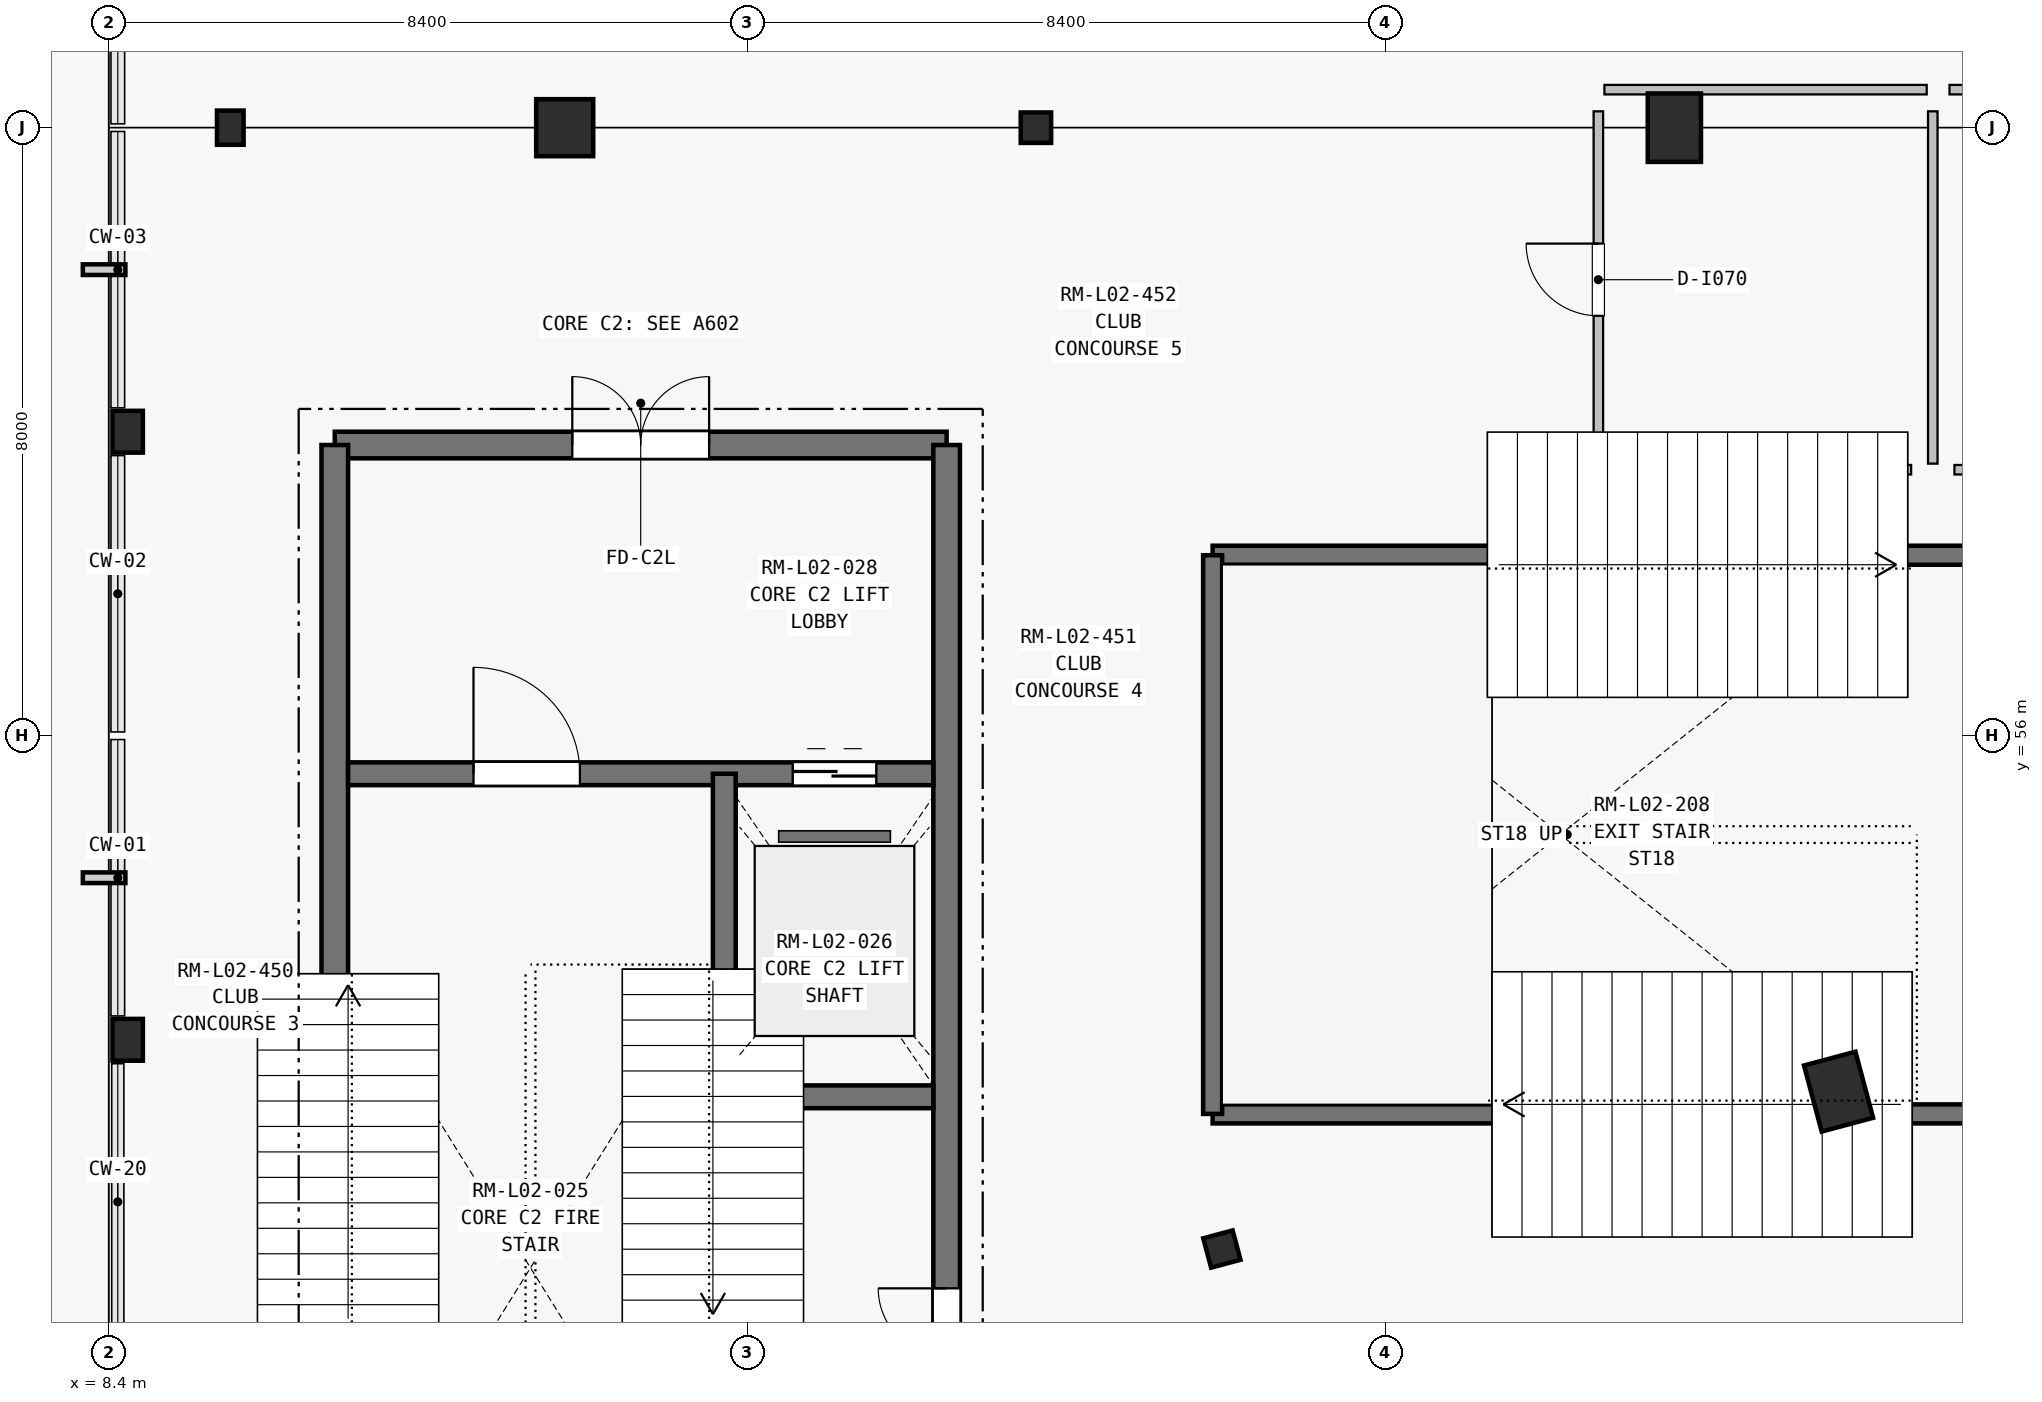
"""IFC4 building model, lengths in metres.
Left out: names, types, materials, properties, quantities, classifications, styles, units other than length and angle.
Written with IfcOpenShell. Run it as: python <this file> out.ifc"""

import sys

from ifc_helpers import new_model, si_unit, direction, frame, frame_2d, origin, origin_2d, place, context, subcontext, project, spatial, rectangle, i_section, extrude, element, fill, save


model = new_model("IFC4")
c1 = context("Model", 3, precision=1e-05, world=origin(), true_north=direction((0.0, 1.0)))
c2 = subcontext(c1, "Body", "Model", "MODEL_VIEW")
j1 = project(units=[si_unit("LENGTHUNIT", "METRE"), si_unit("PLANEANGLEUNIT", "RADIAN")], contexts=[c1])
p1 = place(None, origin())
s1 = spatial("IfcSite", under=j1, at=p1, CompositionType="ELEMENT")
p2 = place(p1, origin())
s2 = spatial("IfcBuilding", under=s1, at=p2, CompositionType="ELEMENT")
p3 = place(p2, frame((0.0, 0.0, 9.9)))
s3 = spatial("IfcBuildingStorey", under=s2, at=p3, CompositionType="ELEMENT", Elevation=9.9)
for number, where, z_axis, x_axis in (
    (1, (29.0, 64.0, 0.0), (0.0, 0.0, 1.0), (-1.0, 0.0, 0.0)),
    (2, (31.16, 51.318, 0.0), (0.0, 0.0, 1.0), (-0.966, -0.259, 0.0)),
):
    element("IfcColumn", number, at=place(p3, frame(where, z_axis=z_axis, x_axis=x_axis)), inside=s3, PredefinedType="COLUMN", context=c2, shape_type="SweptSolid", body=[
        extrude(rectangle(XDim=0.7, YDim=0.9, at=origin_2d()), origin(), (0.0, 0.0, 1.0), 4.5),
    ])
for number, where, z_axis, x_axis in (
    (3, (20.6, 64.0, 0.0), (0.0, 0.0, 1.0), (-1.0, 0.0, 0.0)),
    (4, (23.046, 49.247, 0.0), (0.0, 0.0, 1.0), (-0.966, -0.259, 0.0)),
):
    element("IfcColumn", number, at=place(p3, frame(where, z_axis=z_axis, x_axis=x_axis)), inside=s3, PredefinedType="COLUMN", context=c2, shape_type="SweptSolid", body=[
        extrude(i_section(OverallWidth=0.4, OverallDepth=0.4, WebThickness=0.016, FlangeThickness=0.028, at=origin_2d()), origin(), (0.0, 0.0, 1.0), 4.5),
    ])
p4 = place(p3, frame((14.4, 64.0, 0.0), z_axis=(0.0, 0.0, 1.0), x_axis=(-1.0, 0.0, 0.0)))
e5 = element("IfcColumn", 5, at=p4, inside=s3, PredefinedType="COLUMN", context=c2, shape_type="SweptSolid", body=[
    extrude(rectangle(XDim=0.75, YDim=0.75, at=origin_2d()), origin(), (0.0, 0.0, 1.0), 4.5),
])
for number, where, z_axis, x_axis in (
    (6, (8.65, 52.0, 0.0), (0.0, 0.0, 1.0), (1.0, 0.0, 0.0)),
    (7, (8.65, 60.0, 0.0), (0.0, 0.0, 1.0), (1.0, 0.0, 0.0)),
):
    element("IfcColumn", number, at=place(p3, frame(where, z_axis=z_axis, x_axis=x_axis)), inside=s3, PredefinedType="PILASTER", context=c2, shape_type="SweptSolid", body=[
        extrude(rectangle(XDim=0.4, YDim=0.55, at=origin_2d()), origin(), (0.0, 0.0, 1.0), 4.5),
    ])
p5 = place(p3, frame((10.0, 64.0, 0.0), z_axis=(0.0, 0.0, 1.0), x_axis=(-1.0, 0.0, 0.0)))
e8 = element("IfcColumn", 8, at=p5, inside=s3, PredefinedType="PILASTER", context=c2, shape_type="SweptSolid", body=[
    extrude(rectangle(XDim=0.35, YDim=0.45, at=origin_2d()), origin(), (0.0, 0.0, 1.0), 5.45),
])
p6 = place(p3, frame((11.375, 59.825, 0.0), z_axis=(0.0, 0.0, 1.0), x_axis=(1.0, 0.0, 0.0)))
e9 = element("IfcWall", 9, at=p6, inside=s3, PredefinedType="SHEAR", context=c2, shape_type="SweptSolid", body=[
    extrude(rectangle(XDim=8.05, YDim=0.35, at=frame_2d((4.025, 0.0))), origin(), (0.0, 0.0, 1.0), 4.5),
])
p7 = place(p6, frame((3.125, 0.0, 0.0)))
e10 = element("IfcOpeningElement", 10, at=p7, cuts=e9, PredefinedType="OPENING", context=c2, shape_type="SweptSolid", body=[
    extrude(rectangle(XDim=1.8, YDim=2.25, at=frame_2d((0.9, 1.125))), frame((0.0, 0.185, 0.0), z_axis=(0.0, -1.0, 0.0), x_axis=(1.0, 0.0, 0.0)), (0.0, 0.0, 1.0), 0.37),
])
p8 = place(p3, frame((11.375, 44.975, 0.0), z_axis=(0.0, 0.0, 1.0), x_axis=(0.0, 1.0, 0.0)))
e11 = element("IfcWall", 11, at=p8, inside=s3, PredefinedType="SHEAR", context=c2, shape_type="SweptSolid", body=[
    extrude(rectangle(XDim=14.85, YDim=0.35, at=frame_2d((7.425, 0.0))), origin(), (0.0, 0.0, 1.0), 4.5),
])
p9 = place(p3, frame((19.425, 44.975, 0.0), z_axis=(0.0, 0.0, 1.0), x_axis=(0.0, 1.0, 0.0)))
e12 = element("IfcWall", 12, at=p9, inside=s3, PredefinedType="SHEAR", context=c2, shape_type="SweptSolid", body=[
    extrude(rectangle(XDim=14.85, YDim=0.35, at=frame_2d((7.425, 0.0))), origin(), (0.0, 0.0, 1.0), 4.5),
])
p10 = place(p9, frame((2.855, 0.0, 0.0)))
e13 = element("IfcOpeningElement", 13, at=p10, cuts=e12, PredefinedType="OPENING", context=c2, shape_type="SweptSolid", body=[
    extrude(rectangle(XDim=0.9, YDim=2.1, at=frame_2d((0.45, 1.05))), frame((0.0, 0.185, 0.0), z_axis=(0.0, -1.0, 0.0), x_axis=(1.0, 0.0, 0.0)), (0.0, 0.0, 1.0), 0.37),
])
p11 = place(p3, frame((11.55, 55.5, 0.0), z_axis=(0.0, 0.0, 1.0), x_axis=(1.0, 0.0, 0.0)))
e14 = element("IfcWall", 14, at=p11, inside=s3, PredefinedType="SHEAR", context=c2, shape_type="SweptSolid", body=[
    extrude(rectangle(XDim=7.7, YDim=0.3, at=frame_2d((3.85, 0.0))), origin(), (0.0, 0.0, 1.0), 4.5),
])
p12 = place(p11, frame((1.65, 0.0, 0.0)))
e15 = element("IfcOpeningElement", 15, at=p12, cuts=e14, PredefinedType="OPENING", context=c2, shape_type="SweptSolid", body=[
    extrude(rectangle(XDim=1.4, YDim=2.2, at=frame_2d((0.7, 1.1))), frame((0.0, 0.16, 0.0), z_axis=(0.0, -1.0, 0.0), x_axis=(1.0, 0.0, 0.0)), (0.0, 0.0, 1.0), 0.32),
])
p13 = place(p11, frame((5.85, 0.0, 0.0)))
e16 = element("IfcOpeningElement", 16, at=p13, cuts=e14, PredefinedType="OPENING", context=c2, shape_type="SweptSolid", body=[
    extrude(rectangle(XDim=1.1, YDim=2.2, at=frame_2d((0.55, 1.1))), frame((0.0, 0.16, 0.0), z_axis=(0.0, -1.0, 0.0), x_axis=(1.0, 0.0, 0.0)), (0.0, 0.0, 1.0), 0.32),
])
p14 = place(p3, frame((16.5, 45.15, 0.0), z_axis=(0.0, 0.0, 1.0), x_axis=(0.0, 1.0, 0.0)))
e17 = element("IfcWall", 17, at=p14, inside=s3, PredefinedType="SHEAR", context=c2, shape_type="SweptSolid", body=[
    extrude(rectangle(XDim=10.35, YDim=0.3, at=frame_2d((5.175, 0.0))), origin(), (0.0, 0.0, 1.0), 4.5),
])
p15 = place(p3, frame((16.65, 51.25, 0.0), z_axis=(0.0, 0.0, 1.0), x_axis=(1.0, 0.0, 0.0)))
e18 = element("IfcWall", 18, at=p15, inside=s3, PredefinedType="SHEAR", context=c2, shape_type="SweptSolid", body=[
    extrude(rectangle(XDim=2.6, YDim=0.3, at=frame_2d((1.3, 0.0))), origin(), (0.0, 0.0, 1.0), 4.5),
])
for number, where, z_axis, x_axis in (
    (19, (22.925, 51.025, 0.0), (0.0, 0.0, 1.0), (1.0, 0.0, 0.0)),
    (20, (22.925, 58.375, 0.0), (0.0, 0.0, 1.0), (1.0, 0.0, 0.0)),
):
    element("IfcWall", number, at=place(p3, frame(where, z_axis=z_axis, x_axis=x_axis)), inside=s3, PredefinedType="SHEAR", context=c2, shape_type="SweptSolid", body=[
        extrude(rectangle(XDim=12.75, YDim=0.25, at=frame_2d((6.375, 0.0))), origin(), (0.0, 0.0, 1.0), 4.5),
    ])
p16 = place(p3, frame((22.925, 51.025, 0.0), z_axis=(0.0, 0.0, 1.0), x_axis=(0.0, 1.0, 0.0)))
e21 = element("IfcWall", 21, at=p16, inside=s3, PredefinedType="SHEAR", context=c2, shape_type="SweptSolid", body=[
    extrude(rectangle(XDim=7.35, YDim=0.25, at=frame_2d((3.675, 0.0))), origin(), (0.0, 0.0, 1.0), 4.5),
])
p17 = place(p3, frame((28.08, 64.5, 0.0), z_axis=(0.0, 0.0, 1.0), x_axis=(1.0, 0.0, 0.0)))
e22 = element("IfcWall", 22, at=p17, inside=s3, PredefinedType="PARTITIONING", context=c2, shape_type="SweptSolid", body=[
    extrude(rectangle(XDim=4.24, YDim=0.125, at=frame_2d((2.12, 0.0))), origin(), (0.0, 0.0, 1.0), 4.19),
])
p18 = place(p3, frame((32.4, 64.215, 0.0), z_axis=(0.0, 0.0, 1.0), x_axis=(0.0, -1.0, 0.0)))
e23 = element("IfcWall", 23, at=p18, inside=s3, PredefinedType="PARTITIONING", context=c2, shape_type="SweptSolid", body=[
    extrude(rectangle(XDim=4.635, YDim=0.125, at=frame_2d((2.317, 0.0))), origin(), (0.0, 0.0, 1.0), 3.637),
])
p19 = place(p3, frame((32.115, 59.5, 0.0), z_axis=(0.0, 0.0, 1.0), x_axis=(-1.0, 0.0, 0.0)))
e24 = element("IfcWall", 24, at=p19, inside=s3, PredefinedType="PARTITIONING", context=c2, shape_type="SweptSolid", body=[
    extrude(rectangle(XDim=4.035, YDim=0.125, at=frame_2d((2.018, 0.0))), origin(), (0.0, 0.0, 1.0), 4.22),
])
p20 = place(p3, frame((28.0, 59.785, 0.0), z_axis=(0.0, 0.0, 1.0), x_axis=(0.0, 1.0, 0.0)))
e25 = element("IfcWall", 25, at=p20, inside=s3, PredefinedType="PARTITIONING", context=c2, shape_type="SweptSolid", body=[
    extrude(rectangle(XDim=4.43, YDim=0.125, at=frame_2d((2.215, 0.0))), origin(), (0.0, 0.0, 1.0), 3.637),
])
p21 = place(p20, frame((1.74, 0.0, 0.0)))
e26 = element("IfcOpeningElement", 26, at=p21, cuts=e25, PredefinedType="OPENING", context=c2, shape_type="SweptSolid", body=[
    extrude(rectangle(XDim=0.95, YDim=2.1, at=frame_2d((0.475, 1.05))), frame((0.0, 0.073, 0.0), z_axis=(0.0, -1.0, 0.0), x_axis=(1.0, 0.0, 0.0)), (0.0, 0.0, 1.0), 0.145),
])
p22 = place(p3, frame((36.515, 59.5, 0.0), z_axis=(0.0, 0.0, 1.0), x_axis=(-1.0, 0.0, 0.0)))
e27 = element("IfcWall", 27, at=p22, inside=s3, PredefinedType="PARTITIONING", context=c2, shape_type="SweptSolid", body=[
    extrude(rectangle(XDim=3.83, YDim=0.125, at=frame_2d((1.915, 0.0))), origin(), (0.0, 0.0, 1.0), 4.22),
])
p23 = place(p3, frame((32.62, 64.5, 0.0), z_axis=(0.0, 0.0, 1.0), x_axis=(1.0, 0.0, 0.0)))
e28 = element("IfcWall", 28, at=p23, inside=s3, PredefinedType="PARTITIONING", context=c2, shape_type="SweptSolid", body=[
    extrude(rectangle(XDim=3.895, YDim=0.125, at=frame_2d((1.948, 0.0))), origin(), (0.0, 0.0, 1.0), 4.19),
])
p24 = place(p23, frame((1.488, 0.0, 0.0)))
e29 = element("IfcOpeningElement", 29, at=p24, cuts=e28, PredefinedType="OPENING", context=c2, shape_type="SweptSolid", body=[
    extrude(rectangle(XDim=0.92, YDim=2.1, at=frame_2d((0.46, 1.05))), frame((0.0, 0.073, 0.0), z_axis=(0.0, -1.0, 0.0), x_axis=(1.0, 0.0, 0.0)), (0.0, 0.0, 1.0), 0.145),
])
p25 = place(p7, origin())
e30 = element("IfcDoor", 30, at=p25, inside=s3, OperationType="DOUBLE_DOOR_SINGLE_SWING", PredefinedType="DOOR", context=c2, shape_type="SweptSolid", body=[
    extrude(rectangle(XDim=1.8, YDim=2.25, at=frame_2d((0.9, 1.125))), frame((0.0, 0.025, 0.0), z_axis=(0.0, -1.0, 0.0), x_axis=(1.0, 0.0, 0.0)), (0.0, 0.0, 1.0), 0.05),
])
fill(e10, e30)
p26 = place(p12, origin())
e31 = element("IfcDoor", 31, at=p26, inside=s3, OperationType="SINGLE_SWING_LEFT", PredefinedType="DOOR", context=c2, shape_type="SweptSolid", body=[
    extrude(rectangle(XDim=1.4, YDim=2.2, at=frame_2d((0.7, 1.1))), frame((0.0, 0.025, 0.0), z_axis=(0.0, -1.0, 0.0), x_axis=(1.0, 0.0, 0.0)), (0.0, 0.0, 1.0), 0.05),
])
fill(e15, e31)
p27 = place(p10, origin())
e32 = element("IfcDoor", 32, at=p27, inside=s3, OperationType="SINGLE_SWING_RIGHT", PredefinedType="DOOR", context=c2, shape_type="SweptSolid", body=[
    extrude(rectangle(XDim=0.9, YDim=2.1, at=frame_2d((0.45, 1.05))), frame((0.0, 0.025, 0.0), z_axis=(0.0, -1.0, 0.0), x_axis=(1.0, 0.0, 0.0)), (0.0, 0.0, 1.0), 0.05),
])
fill(e13, e32)
p28 = place(p13, origin())
e33 = element("IfcDoor", 33, at=p28, inside=s3, OperationType="SLIDING_TO_LEFT", PredefinedType="DOOR", context=c2, shape_type="SweptSolid", body=[
    extrude(rectangle(XDim=1.1, YDim=2.2, at=frame_2d((0.55, 1.1))), frame((0.0, 0.025, 0.0), z_axis=(0.0, -1.0, 0.0), x_axis=(1.0, 0.0, 0.0)), (0.0, 0.0, 1.0), 0.05),
])
fill(e16, e33)
p29 = place(p21, origin())
e34 = element("IfcDoor", 34, at=p29, inside=s3, OperationType="SINGLE_SWING_RIGHT", PredefinedType="DOOR", context=c2, shape_type="SweptSolid", body=[
    extrude(rectangle(XDim=0.95, YDim=2.1, at=frame_2d((0.475, 1.05))), frame((0.0, 0.025, 0.0), z_axis=(0.0, -1.0, 0.0), x_axis=(1.0, 0.0, 0.0)), (0.0, 0.0, 1.0), 0.05),
])
fill(e26, e34)
save(model, sys.argv[1])
